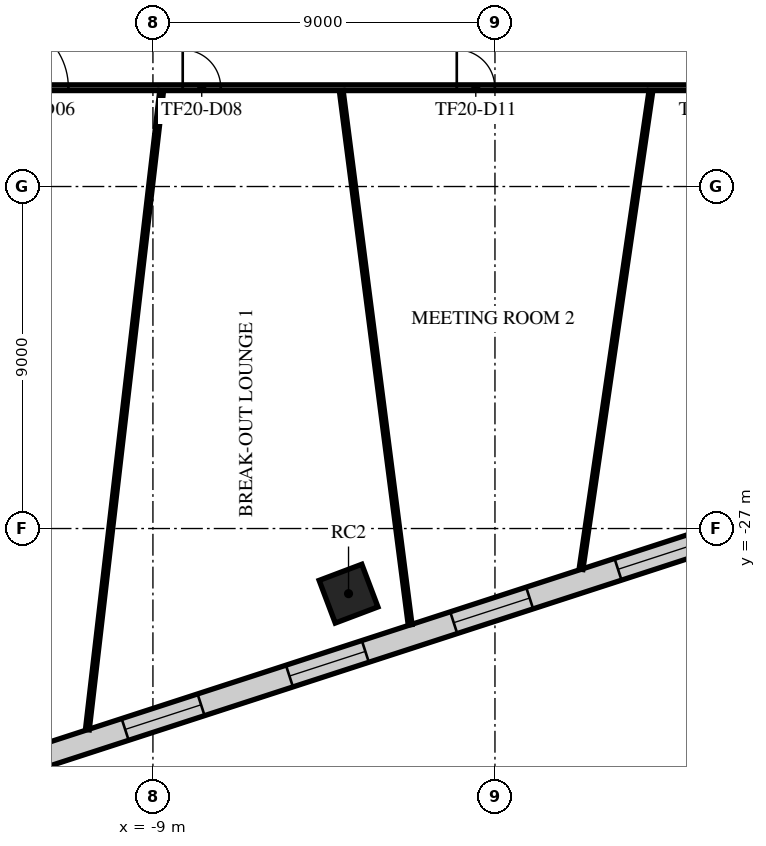
"""IFC4 building model, lengths in metres.
Left out: names, types, materials, properties, quantities, classifications, styles, units other than length and angle.
Written with IfcOpenShell. Run it as: python <this file> out.ifc"""

import sys

from ifc_helpers import new_model, si_unit, direction, frame, frame_2d, origin, origin_2d, place, context, subcontext, project, spatial, rectangle, extrude, element, fill, save


model = new_model("IFC4")
c1 = context("Model", 3, precision=1e-05, world=origin(), true_north=direction((0.0, 1.0)))
c2 = subcontext(c1, "Body", "Model", "MODEL_VIEW")
j1 = project(units=[si_unit("LENGTHUNIT", "METRE"), si_unit("PLANEANGLEUNIT", "RADIAN")], contexts=[c1])
p1 = place(None, origin())
s1 = spatial("IfcSite", under=j1, at=p1, CompositionType="ELEMENT")
p2 = place(p1, origin())
s2 = spatial("IfcBuilding", under=s1, at=p2, CompositionType="ELEMENT")
p3 = place(p2, frame((0.0, 0.0, 90.1)))
s3 = spatial("IfcBuildingStorey", under=s2, at=p3, CompositionType="ELEMENT", Elevation=90.1)
p4 = place(p3, frame((-3.853, -28.714, 0.0), z_axis=(0.0, 0.0, 1.0), x_axis=(0.935491525991, 0.353349125935, 0.0)))
e1 = element("IfcColumn", 1, at=p4, inside=s3, PredefinedType="COLUMN", context=c2, shape_type="SweptSolid", body=[
    extrude(rectangle(XDim=1.2, YDim=1.2, at=origin_2d()), origin(), (0.0, 0.0, 1.0), 4.0),
])
p5 = place(p3, frame((-15.098, -34.031, 0.0), z_axis=(0.0, 0.0, 1.0), x_axis=(0.951056568917, 0.309016832421, 0.0)))
e2 = element("IfcWall", 2, at=p5, inside=s3, PredefinedType="STANDARD", context=c2, shape_type="SweptSolid", body=[
    extrude(rectangle(XDim=49.751, YDim=0.6, at=frame_2d((24.876, 0.0))), origin(), (0.0, 0.0, 1.0), 3.58),
])
p6 = place(p5, frame((1.161, 0.0, 0.9)))
e3 = element("IfcOpeningElement", 3, at=p6, cuts=e2, PredefinedType="OPENING", context=c2, shape_type="SweptSolid", body=[
    extrude(rectangle(XDim=2.1, YDim=2.1, at=frame_2d((1.05, 1.05))), frame((0.0, 0.31, 0.0), z_axis=(0.0, -1.0, 0.0), x_axis=(1.0, 0.0, 0.0)), (0.0, 0.0, 1.0), 0.62),
])
p7 = place(p5, frame((5.644, 0.0, 0.9)))
e4 = element("IfcOpeningElement", 4, at=p7, cuts=e2, PredefinedType="OPENING", context=c2, shape_type="SweptSolid", body=[
    extrude(rectangle(XDim=2.1, YDim=2.1, at=frame_2d((1.05, 1.05))), frame((0.0, 0.31, 0.0), z_axis=(0.0, -1.0, 0.0), x_axis=(1.0, 0.0, 0.0)), (0.0, 0.0, 1.0), 0.62),
])
p8 = place(p5, frame((10.189, 0.0, 0.9)))
e5 = element("IfcOpeningElement", 5, at=p8, cuts=e2, PredefinedType="OPENING", context=c2, shape_type="SweptSolid", body=[
    extrude(rectangle(XDim=2.1, YDim=2.1, at=frame_2d((1.05, 1.05))), frame((0.0, 0.31, 0.0), z_axis=(0.0, -1.0, 0.0), x_axis=(1.0, 0.0, 0.0)), (0.0, 0.0, 1.0), 0.62),
])
p9 = place(p5, frame((14.735, 0.0, 0.9)))
e6 = element("IfcOpeningElement", 6, at=p9, cuts=e2, PredefinedType="OPENING", context=c2, shape_type="SweptSolid", body=[
    extrude(rectangle(XDim=2.1, YDim=2.1, at=frame_2d((1.05, 1.05))), frame((0.0, 0.31, 0.0), z_axis=(0.0, -1.0, 0.0), x_axis=(1.0, 0.0, 0.0)), (0.0, 0.0, 1.0), 0.62),
])
p10 = place(p5, frame((19.28, 0.0, 0.9)))
e7 = element("IfcOpeningElement", 7, at=p10, cuts=e2, PredefinedType="OPENING", context=c2, shape_type="SweptSolid", body=[
    extrude(rectangle(XDim=2.1, YDim=2.1, at=frame_2d((1.05, 1.05))), frame((0.0, 0.31, 0.0), z_axis=(0.0, -1.0, 0.0), x_axis=(1.0, 0.0, 0.0)), (0.0, 0.0, 1.0), 0.62),
])
p11 = place(p5, frame((23.826, 0.0, 0.9)))
e8 = element("IfcOpeningElement", 8, at=p11, cuts=e2, PredefinedType="OPENING", context=c2, shape_type="SweptSolid", body=[
    extrude(rectangle(XDim=2.1, YDim=2.1, at=frame_2d((1.05, 1.05))), frame((0.0, 0.31, 0.0), z_axis=(0.0, -1.0, 0.0), x_axis=(1.0, 0.0, 0.0)), (0.0, 0.0, 1.0), 0.62),
])
p12 = place(p5, frame((28.371, 0.0, 0.9)))
e9 = element("IfcOpeningElement", 9, at=p12, cuts=e2, PredefinedType="OPENING", context=c2, shape_type="SweptSolid", body=[
    extrude(rectangle(XDim=2.1, YDim=2.1, at=frame_2d((1.05, 1.05))), frame((0.0, 0.31, 0.0), z_axis=(0.0, -1.0, 0.0), x_axis=(1.0, 0.0, 0.0)), (0.0, 0.0, 1.0), 0.62),
])
p13 = place(p5, frame((32.917, 0.0, 0.9)))
e10 = element("IfcOpeningElement", 10, at=p13, cuts=e2, PredefinedType="OPENING", context=c2, shape_type="SweptSolid", body=[
    extrude(rectangle(XDim=2.1, YDim=2.1, at=frame_2d((1.05, 1.05))), frame((0.0, 0.31, 0.0), z_axis=(0.0, -1.0, 0.0), x_axis=(1.0, 0.0, 0.0)), (0.0, 0.0, 1.0), 0.62),
])
p14 = place(p5, frame((37.462, 0.0, 0.9)))
e11 = element("IfcOpeningElement", 11, at=p14, cuts=e2, PredefinedType="OPENING", context=c2, shape_type="SweptSolid", body=[
    extrude(rectangle(XDim=2.1, YDim=2.1, at=frame_2d((1.05, 1.05))), frame((0.0, 0.31, 0.0), z_axis=(0.0, -1.0, 0.0), x_axis=(1.0, 0.0, 0.0)), (0.0, 0.0, 1.0), 0.62),
])
p15 = place(p5, frame((42.008, 0.0, 0.9)))
e12 = element("IfcOpeningElement", 12, at=p15, cuts=e2, PredefinedType="OPENING", context=c2, shape_type="SweptSolid", body=[
    extrude(rectangle(XDim=2.1, YDim=2.1, at=frame_2d((1.05, 1.05))), frame((0.0, 0.31, 0.0), z_axis=(0.0, -1.0, 0.0), x_axis=(1.0, 0.0, 0.0)), (0.0, 0.0, 1.0), 0.62),
])
p16 = place(p5, frame((46.491, 0.0, 0.9)))
e13 = element("IfcOpeningElement", 13, at=p16, cuts=e2, PredefinedType="OPENING", context=c2, shape_type="SweptSolid", body=[
    extrude(rectangle(XDim=2.1, YDim=2.1, at=frame_2d((1.05, 1.05))), frame((0.0, 0.31, 0.0), z_axis=(0.0, -1.0, 0.0), x_axis=(1.0, 0.0, 0.0)), (0.0, 0.0, 1.0), 0.62),
])
p17 = place(p3, frame((-15.325, -15.4, 0.0), z_axis=(0.0, 0.0, 1.0), x_axis=(1.0, 0.0, 0.0)))
e14 = element("IfcWall", 14, at=p17, inside=s3, PredefinedType="PARTITIONING", context=c2, shape_type="SweptSolid", body=[
    extrude(rectangle(XDim=30.725, YDim=0.15, at=frame_2d((15.362, 0.0))), origin(), (0.0, 0.0, 1.0), 3.08),
])
p18 = place(p17, frame((2.3, 0.0, 0.0)))
e15 = element("IfcOpeningElement", 15, at=p18, cuts=e14, PredefinedType="OPENING", context=c2, shape_type="SweptSolid", body=[
    extrude(rectangle(XDim=1.8, YDim=2.1, at=frame_2d((0.9, 1.05))), frame((0.0, 0.085, 0.0), z_axis=(0.0, -1.0, 0.0), x_axis=(1.0, 0.0, 0.0)), (0.0, 0.0, 1.0), 0.17),
])
p19 = place(p17, frame((7.109, 0.0, 0.0)))
e16 = element("IfcOpeningElement", 16, at=p19, cuts=e14, PredefinedType="OPENING", context=c2, shape_type="SweptSolid", body=[
    extrude(rectangle(XDim=1.0, YDim=2.1, at=frame_2d((0.5, 1.05))), frame((0.0, 0.085, 0.0), z_axis=(0.0, -1.0, 0.0), x_axis=(1.0, 0.0, 0.0)), (0.0, 0.0, 1.0), 0.17),
])
p20 = place(p17, frame((14.32, 0.0, 0.0)))
e17 = element("IfcOpeningElement", 17, at=p20, cuts=e14, PredefinedType="OPENING", context=c2, shape_type="SweptSolid", body=[
    extrude(rectangle(XDim=1.0, YDim=2.1, at=frame_2d((0.5, 1.05))), frame((0.0, 0.085, 0.0), z_axis=(0.0, -1.0, 0.0), x_axis=(1.0, 0.0, 0.0)), (0.0, 0.0, 1.0), 0.17),
])
p21 = place(p17, frame((24.485, 0.0, 0.0)))
e18 = element("IfcOpeningElement", 18, at=p21, cuts=e14, PredefinedType="OPENING", context=c2, shape_type="SweptSolid", body=[
    extrude(rectangle(XDim=1.8, YDim=2.1, at=frame_2d((0.9, 1.05))), frame((0.0, 0.085, 0.0), z_axis=(0.0, -1.0, 0.0), x_axis=(1.0, 0.0, 0.0)), (0.0, 0.0, 1.0), 0.17),
])
p22 = place(p17, frame((20.735, 0.0, 0.0)))
e19 = element("IfcOpeningElement", 19, at=p22, cuts=e14, PredefinedType="OPENING", context=c2, shape_type="SweptSolid", body=[
    extrude(rectangle(XDim=1.0, YDim=2.1, at=frame_2d((0.5, 1.05))), frame((0.0, 0.085, 0.0), z_axis=(0.0, -1.0, 0.0), x_axis=(1.0, 0.0, 0.0)), (0.0, 0.0, 1.0), 0.17),
])
p23 = place(p3, frame((-10.726, -32.293, 0.0), z_axis=(0.0, 0.0, 1.0), x_axis=(0.115510456464, 0.993306264174, 0.0)))
e20 = element("IfcWall", 20, at=p23, inside=s3, PredefinedType="PARTITIONING", context=c2, shape_type="SweptSolid", body=[
    extrude(rectangle(XDim=16.926, YDim=0.1, at=frame_2d((8.463, 0.0))), origin(), (0.0, 0.0, 1.0), 2.83),
])
p24 = place(p3, frame((-4.044, -15.481, 0.0), z_axis=(0.0, 0.0, 1.0), x_axis=(0.12789369757, -0.991787881617, 0.0)))
e21 = element("IfcWall", 21, at=p24, inside=s3, PredefinedType="PARTITIONING", context=c2, shape_type="SweptSolid", body=[
    extrude(rectangle(XDim=14.168, YDim=0.1, at=frame_2d((7.084, 0.0))), origin(), (0.0, 0.0, 1.0), 2.83),
])
p25 = place(p3, frame((2.264, -28.072, 0.0), z_axis=(0.0, 0.0, 1.0), x_axis=(0.144598494154, 0.989490412025, 0.0)))
e22 = element("IfcWall", 22, at=p25, inside=s3, PredefinedType="PARTITIONING", context=c2, shape_type="SweptSolid", body=[
    extrude(rectangle(XDim=12.724, YDim=0.1, at=frame_2d((6.362, 0.0))), origin(), (0.0, 0.0, 1.0), 2.83),
])
p26 = place(p7, origin())
e23 = element("IfcWindow", 23, at=p26, inside=s3, PartitioningType="SINGLE_PANEL", PredefinedType="WINDOW", context=c2, shape_type="SweptSolid", body=[
    extrude(rectangle(XDim=2.1, YDim=2.1, at=frame_2d((1.05, 1.05))), frame((0.0, 0.03, 0.0), z_axis=(0.0, -1.0, 0.0), x_axis=(1.0, 0.0, 0.0)), (0.0, 0.0, 1.0), 0.06),
])
fill(e4, e23)
p27 = place(p8, origin())
e24 = element("IfcWindow", 24, at=p27, inside=s3, PartitioningType="SINGLE_PANEL", PredefinedType="WINDOW", context=c2, shape_type="SweptSolid", body=[
    extrude(rectangle(XDim=2.1, YDim=2.1, at=frame_2d((1.05, 1.05))), frame((0.0, 0.03, 0.0), z_axis=(0.0, -1.0, 0.0), x_axis=(1.0, 0.0, 0.0)), (0.0, 0.0, 1.0), 0.06),
])
fill(e5, e24)
p28 = place(p9, origin())
e25 = element("IfcWindow", 25, at=p28, inside=s3, PartitioningType="SINGLE_PANEL", PredefinedType="WINDOW", context=c2, shape_type="SweptSolid", body=[
    extrude(rectangle(XDim=2.1, YDim=2.1, at=frame_2d((1.05, 1.05))), frame((0.0, 0.03, 0.0), z_axis=(0.0, -1.0, 0.0), x_axis=(1.0, 0.0, 0.0)), (0.0, 0.0, 1.0), 0.06),
])
fill(e6, e25)
p29 = place(p10, origin())
e26 = element("IfcWindow", 26, at=p29, inside=s3, PartitioningType="SINGLE_PANEL", PredefinedType="WINDOW", context=c2, shape_type="SweptSolid", body=[
    extrude(rectangle(XDim=2.1, YDim=2.1, at=frame_2d((1.05, 1.05))), frame((0.0, 0.03, 0.0), z_axis=(0.0, -1.0, 0.0), x_axis=(1.0, 0.0, 0.0)), (0.0, 0.0, 1.0), 0.06),
])
fill(e7, e26)
p30 = place(p18, frame((1.8, 0.0, 0.0), z_axis=(0.0, 0.0, 1.0), x_axis=(-1.0, 0.0, 0.0)))
e27 = element("IfcDoor", 27, at=p30, inside=s3, OperationType="DOUBLE_DOOR_SINGLE_SWING", PredefinedType="DOOR", context=c2, shape_type="SweptSolid", body=[
    extrude(rectangle(XDim=1.8, YDim=2.1, at=frame_2d((0.9, 1.05))), frame((0.0, 0.025, 0.0), z_axis=(0.0, -1.0, 0.0), x_axis=(1.0, 0.0, 0.0)), (0.0, 0.0, 1.0), 0.05),
])
fill(e15, e27)
p31 = place(p19, frame((1.0, 0.0, 0.0), z_axis=(0.0, 0.0, 1.0), x_axis=(-1.0, 0.0, 0.0)))
e28 = element("IfcDoor", 28, at=p31, inside=s3, OperationType="SINGLE_SWING_LEFT", PredefinedType="DOOR", context=c2, shape_type="SweptSolid", body=[
    extrude(rectangle(XDim=1.0, YDim=2.1, at=frame_2d((0.5, 1.05))), frame((0.0, 0.025, 0.0), z_axis=(0.0, -1.0, 0.0), x_axis=(1.0, 0.0, 0.0)), (0.0, 0.0, 1.0), 0.05),
])
fill(e16, e28)
p32 = place(p20, frame((1.0, 0.0, 0.0), z_axis=(0.0, 0.0, 1.0), x_axis=(-1.0, 0.0, 0.0)))
e29 = element("IfcDoor", 29, at=p32, inside=s3, OperationType="SINGLE_SWING_LEFT", PredefinedType="DOOR", context=c2, shape_type="SweptSolid", body=[
    extrude(rectangle(XDim=1.0, YDim=2.1, at=frame_2d((0.5, 1.05))), frame((0.0, 0.025, 0.0), z_axis=(0.0, -1.0, 0.0), x_axis=(1.0, 0.0, 0.0)), (0.0, 0.0, 1.0), 0.05),
])
fill(e17, e29)
save(model, sys.argv[1])
